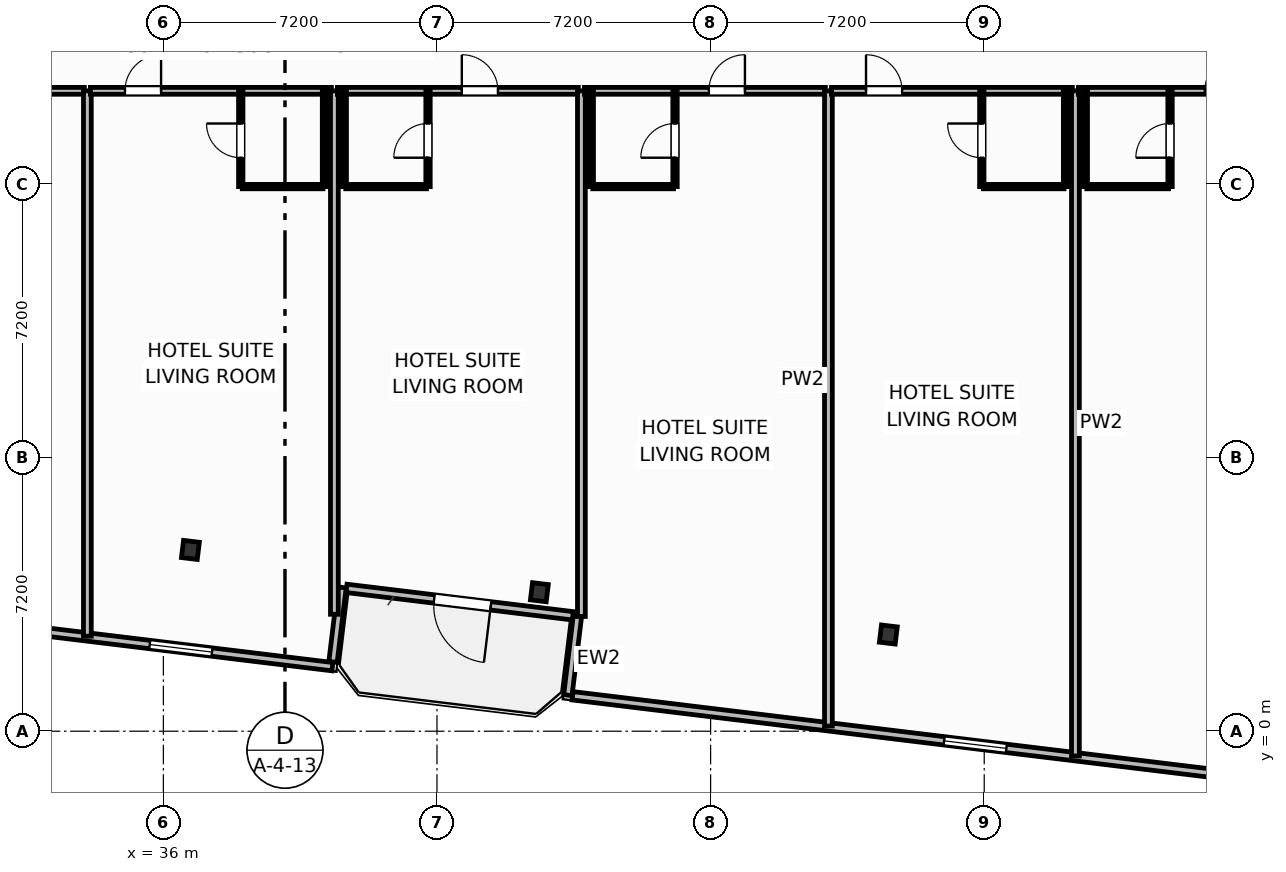
"""IFC4 building model, lengths in metres.
Left out: names, types, materials, properties, quantities, classifications, styles, units other than length and angle.
Written with IfcOpenShell. Run it as: python <this file> out.ifc"""

import sys

from ifc_helpers import new_model, si_unit, direction, frame, frame_2d, origin, origin_2d, place, context, subcontext, project, spatial, rectangle, i_section, extrude, element, fill, save


model = new_model("IFC4")
c1 = context("Model", 3, precision=1e-05, world=origin(), true_north=direction((0.0, 1.0)))
c2 = subcontext(c1, "Body", "Model", "MODEL_VIEW")
j1 = project(units=[si_unit("LENGTHUNIT", "METRE"), si_unit("PLANEANGLEUNIT", "RADIAN")], contexts=[c1])
p1 = place(None, origin())
s1 = spatial("IfcSite", under=j1, at=p1, CompositionType="ELEMENT")
p2 = place(p1, origin())
s2 = spatial("IfcBuilding", under=s1, at=p2, CompositionType="ELEMENT")
p3 = place(p2, frame((0.0, 0.0, 125.4)))
s3 = spatial("IfcBuildingStorey", under=s2, at=p3, CompositionType="ELEMENT", Elevation=125.4)
for number, where, z_axis, x_axis in (
    (1, (36.711, 4.77, 0.0), (0.0, 0.0, 1.0), (0.993, -0.12, 0.0)),
    (2, (45.894, 3.657, 0.0), (0.0, 0.0, 1.0), (0.993, -0.12, 0.0)),
    (3, (55.077, 2.544, 0.0), (0.0, 0.0, 1.0), (0.993, -0.12, 0.0)),
):
    element("IfcColumn", number, at=place(p3, frame(where, z_axis=z_axis, x_axis=x_axis)), inside=s3, PredefinedType="COLUMN", context=c2, shape_type="SweptSolid", body=[
        extrude(i_section(OverallWidth=0.418, OverallDepth=0.455, WebThickness=0.042, FlangeThickness=0.068, FilletRadius=0.025, at=origin_2d()), origin(), (0.0, 0.0, 1.0), 3.7),
    ])
p4 = place(p3, frame((46.776, 3.037, 0.0), z_axis=(0.0, 0.0, 1.0), x_axis=(-0.992735402148, 0.120318000826, 0.0)))
e4 = element("IfcWall", 4, at=p4, inside=s3, PredefinedType="SOLIDWALL", context=c2, shape_type="SweptSolid", body=[
    extrude(rectangle(XDim=6.0, YDim=0.22, at=frame_2d((3.0, 0.0))), origin(), (0.0, 0.0, 1.0), 2.73),
])
p5 = place(p4, frame((2.176, 0.0, 0.0)))
e5 = element("IfcOpeningElement", 5, at=p5, cuts=e4, PredefinedType="OPENING", context=c2, shape_type="SweptSolid", body=[
    extrude(rectangle(XDim=1.5, YDim=2.25, at=frame_2d((0.75, 1.125))), frame((0.0, 0.12, 0.0), z_axis=(0.0, -1.0, 0.0), x_axis=(1.0, 0.0, 0.0)), (0.0, 0.0, 1.0), 0.24),
])
p6 = place(p3, frame((32.472, 2.665, 0.0), z_axis=(0.0, 0.0, 1.0), x_axis=(0.992734661931, -0.120324108143, 0.0)))
e6 = element("IfcWall", 6, at=p6, inside=s3, PredefinedType="SOLIDWALL", context=c2, shape_type="SweptSolid", body=[
    extrude(rectangle(XDim=8.035, YDim=0.22, at=frame_2d((4.018, 0.0))), origin(), (0.0, 0.0, 1.0), 2.73),
])
p7 = place(p6, frame((3.192, 0.0, 0.8)))
e7 = element("IfcOpeningElement", 7, at=p7, cuts=e6, PredefinedType="OPENING", context=c2, shape_type="SweptSolid", body=[
    extrude(rectangle(XDim=1.65, YDim=1.65, at=frame_2d((0.825, 0.825))), frame((0.0, 0.12, 0.0), z_axis=(0.0, -1.0, 0.0), x_axis=(1.0, 0.0, 0.0)), (0.0, 0.0, 1.0), 0.24),
])
p8 = place(p3, frame((40.464, 1.822, 0.0), z_axis=(0.0, 0.0, 1.0), x_axis=(0.120275992932, 0.992740492538, 0.0)))
e8 = element("IfcWall", 8, at=p8, inside=s3, PredefinedType="SOLIDWALL", context=c2, shape_type="SweptSolid", body=[
    extrude(rectangle(XDim=1.975, YDim=0.22, at=frame_2d((0.988, 0.0))), origin(), (0.0, 0.0, 1.0), 2.73),
])
p9 = place(p3, frame((46.896, 3.032, 0.0), z_axis=(0.0, 0.0, 1.0), x_axis=(-0.120327895535, -0.992734202874, 0.0)))
e9 = element("IfcWall", 9, at=p9, inside=s3, PredefinedType="SOLIDWALL", context=c2, shape_type="SweptSolid", body=[
    extrude(rectangle(XDim=2.1, YDim=0.22, at=frame_2d((1.05, 0.0))), origin(), (0.0, 0.0, 1.0), 2.73),
])
p10 = place(p3, frame((46.768, 0.932, 0.0), z_axis=(0.0, 0.0, 1.0), x_axis=(0.992733036814, -0.120337515419, 0.0)))
e10 = element("IfcWall", 10, at=p10, inside=s3, PredefinedType="SOLIDWALL", context=c2, shape_type="SweptSolid", body=[
    extrude(rectangle(XDim=21.347, YDim=0.22, at=frame_2d((10.673, 0.0))), origin(), (0.0, 0.0, 1.0), 2.73),
])
p11 = place(p10, frame((9.849, 0.0, 0.8)))
e11 = element("IfcOpeningElement", 11, at=p11, cuts=e10, PredefinedType="OPENING", context=c2, shape_type="SweptSolid", body=[
    extrude(rectangle(XDim=1.65, YDim=1.65, at=frame_2d((0.825, 0.825))), frame((0.0, 0.12, 0.0), z_axis=(0.0, -1.0, 0.0), x_axis=(1.0, 0.0, 0.0)), (0.0, 0.0, 1.0), 0.24),
])
p12 = place(p3, frame((27.58, 16.85, 0.0), z_axis=(0.0, 0.0, 1.0), x_axis=(1.0, 0.0, 0.0)))
e12 = element("IfcWall", 12, at=p12, inside=s3, PredefinedType="PARTITIONING", context=c2, shape_type="SweptSolid", body=[
    extrude(rectangle(XDim=6.34, YDim=0.18, at=frame_2d((3.17, 0.0))), origin(), (0.0, 0.0, 1.0), 3.45),
])
p13 = place(p12, frame((3.274, 0.0, 0.0)))
e13 = element("IfcOpeningElement", 13, at=p13, cuts=e12, PredefinedType="OPENING", context=c2, shape_type="SweptSolid", body=[
    extrude(rectangle(XDim=0.95, YDim=2.15, at=frame_2d((0.475, 1.075))), frame((0.0, 0.1, 0.0), z_axis=(0.0, -1.0, 0.0), x_axis=(1.0, 0.0, 0.0)), (0.0, 0.0, 1.0), 0.2),
])
p14 = place(p3, frame((34.0, 2.5, 0.0), z_axis=(0.0, 0.0, 1.0), x_axis=(0.0, 1.0, 0.0)))
e14 = element("IfcWall", 14, at=p14, inside=s3, PredefinedType="PARTITIONING", context=c2, shape_type="SweptSolid", body=[
    extrude(rectangle(XDim=14.35, YDim=0.205, at=frame_2d((7.175, 0.0))), origin(), (0.0, 0.0, 1.0), 3.45),
])
p15 = place(p3, frame((34.08, 16.85, 0.0), z_axis=(0.0, 0.0, 1.0), x_axis=(1.0, 0.0, 0.0)))
e15 = element("IfcWall", 15, at=p15, inside=s3, PredefinedType="PARTITIONING", context=c2, shape_type="SweptSolid", body=[
    extrude(rectangle(XDim=6.34, YDim=0.18, at=frame_2d((3.17, 0.0))), origin(), (0.0, 0.0, 1.0), 3.45),
])
p16 = place(p15, frame((0.91, 0.0, 0.0)))
e16 = element("IfcOpeningElement", 16, at=p16, cuts=e15, PredefinedType="OPENING", context=c2, shape_type="SweptSolid", body=[
    extrude(rectangle(XDim=0.95, YDim=2.15, at=frame_2d((0.475, 1.075))), frame((0.0, 0.1, 0.0), z_axis=(0.0, -1.0, 0.0), x_axis=(1.0, 0.0, 0.0)), (0.0, 0.0, 1.0), 0.2),
])
p17 = place(p3, frame((38.076, 14.33, 0.0), z_axis=(0.0, 0.0, 1.0), x_axis=(1.0, 0.0, 0.0)))
e17 = element("IfcWall", 17, at=p17, inside=s3, PredefinedType="PARTITIONING", context=c2, shape_type="SweptSolid", body=[
    extrude(rectangle(XDim=2.124, YDim=0.115, at=frame_2d((1.062, 0.0))), origin(), (0.0, 0.0, 1.0), 3.45),
])
p18 = place(p3, frame((38.036, 14.33, 0.0), z_axis=(0.0, 0.0, 1.0), x_axis=(0.0, 1.0, 0.0)))
e18 = element("IfcWall", 18, at=p18, inside=s3, PredefinedType="PARTITIONING", context=c2, shape_type="SweptSolid", body=[
    extrude(rectangle(XDim=2.52, YDim=0.115, at=frame_2d((1.26, 0.0))), origin(), (0.0, 0.0, 1.0), 3.45),
])
p19 = place(p18, frame((0.76, 0.0, 0.0)))
e19 = element("IfcOpeningElement", 19, at=p19, cuts=e18, PredefinedType="OPENING", context=c2, shape_type="SweptSolid", body=[
    extrude(rectangle(XDim=0.9, YDim=2.05, at=frame_2d((0.45, 1.025))), frame((0.0, 0.067, 0.0), z_axis=(0.0, -1.0, 0.0), x_axis=(1.0, 0.0, 0.0)), (0.0, 0.0, 1.0), 0.135),
])
p20 = place(p3, frame((40.24, 14.33, 0.0), z_axis=(0.0, 0.0, 1.0), x_axis=(0.0, 1.0, 0.0)))
e20 = element("IfcWall", 20, at=p20, inside=s3, PredefinedType="PARTITIONING", context=c2, shape_type="SweptSolid", body=[
    extrude(rectangle(XDim=2.52, YDim=0.115, at=frame_2d((1.26, 0.0))), origin(), (0.0, 0.0, 1.0), 3.45),
])
p21 = place(p3, frame((40.5, 3.077, 0.0), z_axis=(0.0, 0.0, 1.0), x_axis=(0.0, 1.0, 0.0)))
e21 = element("IfcWall", 21, at=p21, inside=s3, PredefinedType="PARTITIONING", context=c2, shape_type="SweptSolid", body=[
    extrude(rectangle(XDim=13.773, YDim=0.205, at=frame_2d((6.887, 0.0))), origin(), (0.0, 0.0, 1.0), 3.45),
])
p22 = place(p3, frame((40.58, 16.85, 0.0), z_axis=(0.0, 0.0, 1.0), x_axis=(1.0, 0.0, 0.0)))
e22 = element("IfcWall", 22, at=p22, inside=s3, PredefinedType="PARTITIONING", context=c2, shape_type="SweptSolid", body=[
    extrude(rectangle(XDim=6.34, YDim=0.18, at=frame_2d((3.17, 0.0))), origin(), (0.0, 0.0, 1.0), 3.45),
])
p23 = place(p22, frame((3.274, 0.0, 0.0)))
e23 = element("IfcOpeningElement", 23, at=p23, cuts=e22, PredefinedType="OPENING", context=c2, shape_type="SweptSolid", body=[
    extrude(rectangle(XDim=0.95, YDim=2.15, at=frame_2d((0.475, 1.075))), frame((0.0, 0.1, 0.0), z_axis=(0.0, -1.0, 0.0), x_axis=(1.0, 0.0, 0.0)), (0.0, 0.0, 1.0), 0.2),
])
p24 = place(p3, frame((40.8, 14.33, 0.0), z_axis=(0.0, 0.0, 1.0), x_axis=(1.0, 0.0, 0.0)))
e24 = element("IfcWall", 24, at=p24, inside=s3, PredefinedType="PARTITIONING", context=c2, shape_type="SweptSolid", body=[
    extrude(rectangle(XDim=2.124, YDim=0.115, at=frame_2d((1.062, 0.0))), origin(), (0.0, 0.0, 1.0), 3.45),
])
p25 = place(p3, frame((42.964, 14.33, 0.0), z_axis=(0.0, 0.0, 1.0), x_axis=(0.0, 1.0, 0.0)))
e25 = element("IfcWall", 25, at=p25, inside=s3, PredefinedType="PARTITIONING", context=c2, shape_type="SweptSolid", body=[
    extrude(rectangle(XDim=2.52, YDim=0.115, at=frame_2d((1.26, 0.0))), origin(), (0.0, 0.0, 1.0), 3.45),
])
p26 = place(p25, frame((0.76, 0.0, 0.0)))
e26 = element("IfcOpeningElement", 26, at=p26, cuts=e25, PredefinedType="OPENING", context=c2, shape_type="SweptSolid", body=[
    extrude(rectangle(XDim=0.9, YDim=2.05, at=frame_2d((0.45, 1.025))), frame((0.0, 0.067, 0.0), z_axis=(0.0, -1.0, 0.0), x_axis=(1.0, 0.0, 0.0)), (0.0, 0.0, 1.0), 0.135),
])
p27 = place(p3, frame((40.76, 14.33, 0.0), z_axis=(0.0, 0.0, 1.0), x_axis=(0.0, 1.0, 0.0)))
e27 = element("IfcWall", 27, at=p27, inside=s3, PredefinedType="PARTITIONING", context=c2, shape_type="SweptSolid", body=[
    extrude(rectangle(XDim=2.52, YDim=0.115, at=frame_2d((1.26, 0.0))), origin(), (0.0, 0.0, 1.0), 3.45),
])
p28 = place(p3, frame((47.0, 3.019, 0.0), z_axis=(0.0, 0.0, 1.0), x_axis=(0.0, 1.0, 0.0)))
e28 = element("IfcWall", 28, at=p28, inside=s3, PredefinedType="PARTITIONING", context=c2, shape_type="SweptSolid", body=[
    extrude(rectangle(XDim=13.831, YDim=0.205, at=frame_2d((6.916, 0.0))), origin(), (0.0, 0.0, 1.0), 3.45),
])
p29 = place(p3, frame((47.08, 16.85, 0.0), z_axis=(0.0, 0.0, 1.0), x_axis=(1.0, 0.0, 0.0)))
e29 = element("IfcWall", 29, at=p29, inside=s3, PredefinedType="PARTITIONING", context=c2, shape_type="SweptSolid", body=[
    extrude(rectangle(XDim=6.34, YDim=0.18, at=frame_2d((3.17, 0.0))), origin(), (0.0, 0.0, 1.0), 3.45),
])
p30 = place(p29, frame((3.274, 0.0, 0.0)))
e30 = element("IfcOpeningElement", 30, at=p30, cuts=e29, PredefinedType="OPENING", context=c2, shape_type="SweptSolid", body=[
    extrude(rectangle(XDim=0.95, YDim=2.15, at=frame_2d((0.475, 1.075))), frame((0.0, 0.1, 0.0), z_axis=(0.0, -1.0, 0.0), x_axis=(1.0, 0.0, 0.0)), (0.0, 0.0, 1.0), 0.2),
])
p31 = place(p3, frame((47.3, 14.33, 0.0), z_axis=(0.0, 0.0, 1.0), x_axis=(1.0, 0.0, 0.0)))
e31 = element("IfcWall", 31, at=p31, inside=s3, PredefinedType="PARTITIONING", context=c2, shape_type="SweptSolid", body=[
    extrude(rectangle(XDim=2.124, YDim=0.115, at=frame_2d((1.062, 0.0))), origin(), (0.0, 0.0, 1.0), 3.45),
])
p32 = place(p3, frame((49.464, 14.33, 0.0), z_axis=(0.0, 0.0, 1.0), x_axis=(0.0, 1.0, 0.0)))
e32 = element("IfcWall", 32, at=p32, inside=s3, PredefinedType="PARTITIONING", context=c2, shape_type="SweptSolid", body=[
    extrude(rectangle(XDim=2.52, YDim=0.115, at=frame_2d((1.26, 0.0))), origin(), (0.0, 0.0, 1.0), 3.45),
])
p33 = place(p32, frame((0.76, 0.0, 0.0)))
e33 = element("IfcOpeningElement", 33, at=p33, cuts=e32, PredefinedType="OPENING", context=c2, shape_type="SweptSolid", body=[
    extrude(rectangle(XDim=0.9, YDim=2.05, at=frame_2d((0.45, 1.025))), frame((0.0, 0.067, 0.0), z_axis=(0.0, -1.0, 0.0), x_axis=(1.0, 0.0, 0.0)), (0.0, 0.0, 1.0), 0.135),
])
p34 = place(p3, frame((47.26, 14.33, 0.0), z_axis=(0.0, 0.0, 1.0), x_axis=(0.0, 1.0, 0.0)))
e34 = element("IfcWall", 34, at=p34, inside=s3, PredefinedType="PARTITIONING", context=c2, shape_type="SweptSolid", body=[
    extrude(rectangle(XDim=2.52, YDim=0.115, at=frame_2d((1.26, 0.0))), origin(), (0.0, 0.0, 1.0), 3.45),
])
p35 = place(p3, frame((53.5, 0.136, 0.0), z_axis=(0.0, 0.0, 1.0), x_axis=(0.0, 1.0, 0.0)))
e35 = element("IfcWall", 35, at=p35, inside=s3, PredefinedType="PARTITIONING", context=c2, shape_type="SweptSolid", body=[
    extrude(rectangle(XDim=16.714, YDim=0.205, at=frame_2d((8.357, 0.0))), origin(), (0.0, 0.0, 1.0), 3.45),
])
p36 = place(p3, frame((53.58, 16.85, 0.0), z_axis=(0.0, 0.0, 1.0), x_axis=(1.0, 0.0, 0.0)))
e36 = element("IfcWall", 36, at=p36, inside=s3, PredefinedType="PARTITIONING", context=c2, shape_type="SweptSolid", body=[
    extrude(rectangle(XDim=6.34, YDim=0.18, at=frame_2d((3.17, 0.0))), origin(), (0.0, 0.0, 1.0), 3.45),
])
p37 = place(p36, frame((0.91, 0.0, 0.0)))
e37 = element("IfcOpeningElement", 37, at=p37, cuts=e36, PredefinedType="OPENING", context=c2, shape_type="SweptSolid", body=[
    extrude(rectangle(XDim=0.95, YDim=2.15, at=frame_2d((0.475, 1.075))), frame((0.0, 0.1, 0.0), z_axis=(0.0, -1.0, 0.0), x_axis=(1.0, 0.0, 0.0)), (0.0, 0.0, 1.0), 0.2),
])
p38 = place(p3, frame((57.576, 14.33, 0.0), z_axis=(0.0, 0.0, 1.0), x_axis=(1.0, 0.0, 0.0)))
e38 = element("IfcWall", 38, at=p38, inside=s3, PredefinedType="PARTITIONING", context=c2, shape_type="SweptSolid", body=[
    extrude(rectangle(XDim=2.124, YDim=0.115, at=frame_2d((1.062, 0.0))), origin(), (0.0, 0.0, 1.0), 3.45),
])
p39 = place(p3, frame((57.536, 14.33, 0.0), z_axis=(0.0, 0.0, 1.0), x_axis=(0.0, 1.0, 0.0)))
e39 = element("IfcWall", 39, at=p39, inside=s3, PredefinedType="PARTITIONING", context=c2, shape_type="SweptSolid", body=[
    extrude(rectangle(XDim=2.52, YDim=0.115, at=frame_2d((1.26, 0.0))), origin(), (0.0, 0.0, 1.0), 3.45),
])
p40 = place(p39, frame((0.76, 0.0, 0.0)))
e40 = element("IfcOpeningElement", 40, at=p40, cuts=e39, PredefinedType="OPENING", context=c2, shape_type="SweptSolid", body=[
    extrude(rectangle(XDim=0.9, YDim=2.05, at=frame_2d((0.45, 1.025))), frame((0.0, 0.067, 0.0), z_axis=(0.0, -1.0, 0.0), x_axis=(1.0, 0.0, 0.0)), (0.0, 0.0, 1.0), 0.135),
])
p41 = place(p3, frame((59.74, 14.33, 0.0), z_axis=(0.0, 0.0, 1.0), x_axis=(0.0, 1.0, 0.0)))
e41 = element("IfcWall", 41, at=p41, inside=s3, PredefinedType="PARTITIONING", context=c2, shape_type="SweptSolid", body=[
    extrude(rectangle(XDim=2.52, YDim=0.115, at=frame_2d((1.26, 0.0))), origin(), (0.0, 0.0, 1.0), 3.45),
])
p42 = place(p3, frame((60.0, -0.652, 0.0), z_axis=(0.0, 0.0, 1.0), x_axis=(0.0, 1.0, 0.0)))
e42 = element("IfcWall", 42, at=p42, inside=s3, PredefinedType="PARTITIONING", context=c2, shape_type="SweptSolid", body=[
    extrude(rectangle(XDim=17.502, YDim=0.205, at=frame_2d((8.751, 0.0))), origin(), (0.0, 0.0, 1.0), 3.45),
])
p43 = place(p3, frame((60.08, 16.85, 0.0), z_axis=(0.0, 0.0, 1.0), x_axis=(1.0, 0.0, 0.0)))
e43 = element("IfcWall", 43, at=p43, inside=s3, PredefinedType="PARTITIONING", context=c2, shape_type="SweptSolid", body=[
    extrude(rectangle(XDim=15.387, YDim=0.18, at=frame_2d((7.693, 0.0))), origin(), (0.0, 0.0, 1.0), 3.45),
])
p44 = place(p43, frame((3.325, 0.0, 0.0)))
e44 = element("IfcOpeningElement", 44, at=p44, cuts=e43, PredefinedType="OPENING", context=c2, shape_type="SweptSolid", body=[
    extrude(rectangle(XDim=0.95, YDim=2.15, at=frame_2d((0.475, 1.075))), frame((0.0, 0.1, 0.0), z_axis=(0.0, -1.0, 0.0), x_axis=(1.0, 0.0, 0.0)), (0.0, 0.0, 1.0), 0.2),
])
p45 = place(p3, frame((60.3, 14.33, 0.0), z_axis=(0.0, 0.0, 1.0), x_axis=(1.0, 0.0, 0.0)))
e45 = element("IfcWall", 45, at=p45, inside=s3, PredefinedType="PARTITIONING", context=c2, shape_type="SweptSolid", body=[
    extrude(rectangle(XDim=2.15, YDim=0.115, at=frame_2d((1.075, 0.0))), origin(), (0.0, 0.0, 1.0), 3.45),
])
p46 = place(p3, frame((62.49, 14.33, 0.0), z_axis=(0.0, 0.0, 1.0), x_axis=(0.0, 1.0, 0.0)))
e46 = element("IfcWall", 46, at=p46, inside=s3, PredefinedType="PARTITIONING", context=c2, shape_type="SweptSolid", body=[
    extrude(rectangle(XDim=2.52, YDim=0.115, at=frame_2d((1.26, 0.0))), origin(), (0.0, 0.0, 1.0), 3.45),
])
p47 = place(p46, frame((0.76, 0.0, 0.0)))
e47 = element("IfcOpeningElement", 47, at=p47, cuts=e46, PredefinedType="OPENING", context=c2, shape_type="SweptSolid", body=[
    extrude(rectangle(XDim=0.9, YDim=2.05, at=frame_2d((0.45, 1.025))), frame((0.0, 0.067, 0.0), z_axis=(0.0, -1.0, 0.0), x_axis=(1.0, 0.0, 0.0)), (0.0, 0.0, 1.0), 0.135),
])
p48 = place(p3, frame((60.26, 14.33, 0.0), z_axis=(0.0, 0.0, 1.0), x_axis=(0.0, 1.0, 0.0)))
e48 = element("IfcWall", 48, at=p48, inside=s3, PredefinedType="PARTITIONING", context=c2, shape_type="SweptSolid", body=[
    extrude(rectangle(XDim=2.52, YDim=0.115, at=frame_2d((1.26, 0.0))), origin(), (0.0, 0.0, 1.0), 3.45),
])
p49 = place(p5, origin())
e49 = element("IfcDoor", 49, at=p49, inside=s3, OperationType="SINGLE_SWING_LEFT", PredefinedType="DOOR", context=c2, shape_type="SweptSolid", body=[
    extrude(rectangle(XDim=1.5, YDim=2.25, at=frame_2d((0.75, 1.125))), frame((0.0, 0.025, 0.0), z_axis=(0.0, -1.0, 0.0), x_axis=(1.0, 0.0, 0.0)), (0.0, 0.0, 1.0), 0.05),
])
fill(e5, e49)
p50 = place(p7, origin())
e50 = element("IfcWindow", 50, at=p50, inside=s3, PartitioningType="SINGLE_PANEL", PredefinedType="WINDOW", context=c2, shape_type="SweptSolid", body=[
    extrude(rectangle(XDim=1.65, YDim=1.65, at=frame_2d((0.825, 0.825))), frame((0.0, 0.03, 0.0), z_axis=(0.0, -1.0, 0.0), x_axis=(1.0, 0.0, 0.0)), (0.0, 0.0, 1.0), 0.06),
])
fill(e7, e50)
p51 = place(p11, origin())
e51 = element("IfcWindow", 51, at=p51, inside=s3, PartitioningType="SINGLE_PANEL", PredefinedType="WINDOW", context=c2, shape_type="SweptSolid", body=[
    extrude(rectangle(XDim=1.65, YDim=1.65, at=frame_2d((0.825, 0.825))), frame((0.0, 0.03, 0.0), z_axis=(0.0, -1.0, 0.0), x_axis=(1.0, 0.0, 0.0)), (0.0, 0.0, 1.0), 0.06),
])
fill(e11, e51)
p52 = place(p16, origin())
e52 = element("IfcDoor", 52, at=p52, inside=s3, OperationType="SINGLE_SWING_RIGHT", PredefinedType="DOOR", context=c2, shape_type="SweptSolid", body=[
    extrude(rectangle(XDim=0.95, YDim=2.15, at=frame_2d((0.475, 1.075))), frame((0.0, 0.025, 0.0), z_axis=(0.0, -1.0, 0.0), x_axis=(1.0, 0.0, 0.0)), (0.0, 0.0, 1.0), 0.05),
])
fill(e16, e52)
p53 = place(p19, origin())
e53 = element("IfcDoor", 53, at=p53, inside=s3, OperationType="SINGLE_SWING_RIGHT", PredefinedType="DOOR", context=c2, shape_type="SweptSolid", body=[
    extrude(rectangle(XDim=0.9, YDim=2.05, at=frame_2d((0.45, 1.025))), frame((0.0, 0.025, 0.0), z_axis=(0.0, -1.0, 0.0), x_axis=(1.0, 0.0, 0.0)), (0.0, 0.0, 1.0), 0.05),
])
fill(e19, e53)
p54 = place(p23, origin())
e54 = element("IfcDoor", 54, at=p54, inside=s3, OperationType="SINGLE_SWING_LEFT", PredefinedType="DOOR", context=c2, shape_type="SweptSolid", body=[
    extrude(rectangle(XDim=0.95, YDim=2.15, at=frame_2d((0.475, 1.075))), frame((0.0, 0.025, 0.0), z_axis=(0.0, -1.0, 0.0), x_axis=(1.0, 0.0, 0.0)), (0.0, 0.0, 1.0), 0.05),
])
fill(e23, e54)
p55 = place(p26, origin())
e55 = element("IfcDoor", 55, at=p55, inside=s3, OperationType="SINGLE_SWING_LEFT", PredefinedType="DOOR", context=c2, shape_type="SweptSolid", body=[
    extrude(rectangle(XDim=0.9, YDim=2.05, at=frame_2d((0.45, 1.025))), frame((0.0, 0.025, 0.0), z_axis=(0.0, -1.0, 0.0), x_axis=(1.0, 0.0, 0.0)), (0.0, 0.0, 1.0), 0.05),
])
fill(e26, e55)
p56 = place(p30, origin())
e56 = element("IfcDoor", 56, at=p56, inside=s3, OperationType="SINGLE_SWING_RIGHT", PredefinedType="DOOR", context=c2, shape_type="SweptSolid", body=[
    extrude(rectangle(XDim=0.95, YDim=2.15, at=frame_2d((0.475, 1.075))), frame((0.0, 0.025, 0.0), z_axis=(0.0, -1.0, 0.0), x_axis=(1.0, 0.0, 0.0)), (0.0, 0.0, 1.0), 0.05),
])
fill(e30, e56)
p57 = place(p33, origin())
e57 = element("IfcDoor", 57, at=p57, inside=s3, OperationType="SINGLE_SWING_LEFT", PredefinedType="DOOR", context=c2, shape_type="SweptSolid", body=[
    extrude(rectangle(XDim=0.9, YDim=2.05, at=frame_2d((0.45, 1.025))), frame((0.0, 0.025, 0.0), z_axis=(0.0, -1.0, 0.0), x_axis=(1.0, 0.0, 0.0)), (0.0, 0.0, 1.0), 0.05),
])
fill(e33, e57)
p58 = place(p37, origin())
e58 = element("IfcDoor", 58, at=p58, inside=s3, OperationType="SINGLE_SWING_LEFT", PredefinedType="DOOR", context=c2, shape_type="SweptSolid", body=[
    extrude(rectangle(XDim=0.95, YDim=2.15, at=frame_2d((0.475, 1.075))), frame((0.0, 0.025, 0.0), z_axis=(0.0, -1.0, 0.0), x_axis=(1.0, 0.0, 0.0)), (0.0, 0.0, 1.0), 0.05),
])
fill(e37, e58)
p59 = place(p40, origin())
e59 = element("IfcDoor", 59, at=p59, inside=s3, OperationType="SINGLE_SWING_RIGHT", PredefinedType="DOOR", context=c2, shape_type="SweptSolid", body=[
    extrude(rectangle(XDim=0.9, YDim=2.05, at=frame_2d((0.45, 1.025))), frame((0.0, 0.025, 0.0), z_axis=(0.0, -1.0, 0.0), x_axis=(1.0, 0.0, 0.0)), (0.0, 0.0, 1.0), 0.05),
])
fill(e40, e59)
p60 = place(p44, origin())
e60 = element("IfcDoor", 60, at=p60, inside=s3, OperationType="SINGLE_SWING_RIGHT", PredefinedType="DOOR", context=c2, shape_type="SweptSolid", body=[
    extrude(rectangle(XDim=0.95, YDim=2.15, at=frame_2d((0.475, 1.075))), frame((0.0, 0.025, 0.0), z_axis=(0.0, -1.0, 0.0), x_axis=(1.0, 0.0, 0.0)), (0.0, 0.0, 1.0), 0.05),
])
fill(e44, e60)
p61 = place(p47, origin())
e61 = element("IfcDoor", 61, at=p61, inside=s3, OperationType="SINGLE_SWING_LEFT", PredefinedType="DOOR", context=c2, shape_type="SweptSolid", body=[
    extrude(rectangle(XDim=0.9, YDim=2.05, at=frame_2d((0.45, 1.025))), frame((0.0, 0.025, 0.0), z_axis=(0.0, -1.0, 0.0), x_axis=(1.0, 0.0, 0.0)), (0.0, 0.0, 1.0), 0.05),
])
fill(e47, e61)
save(model, sys.argv[1])
